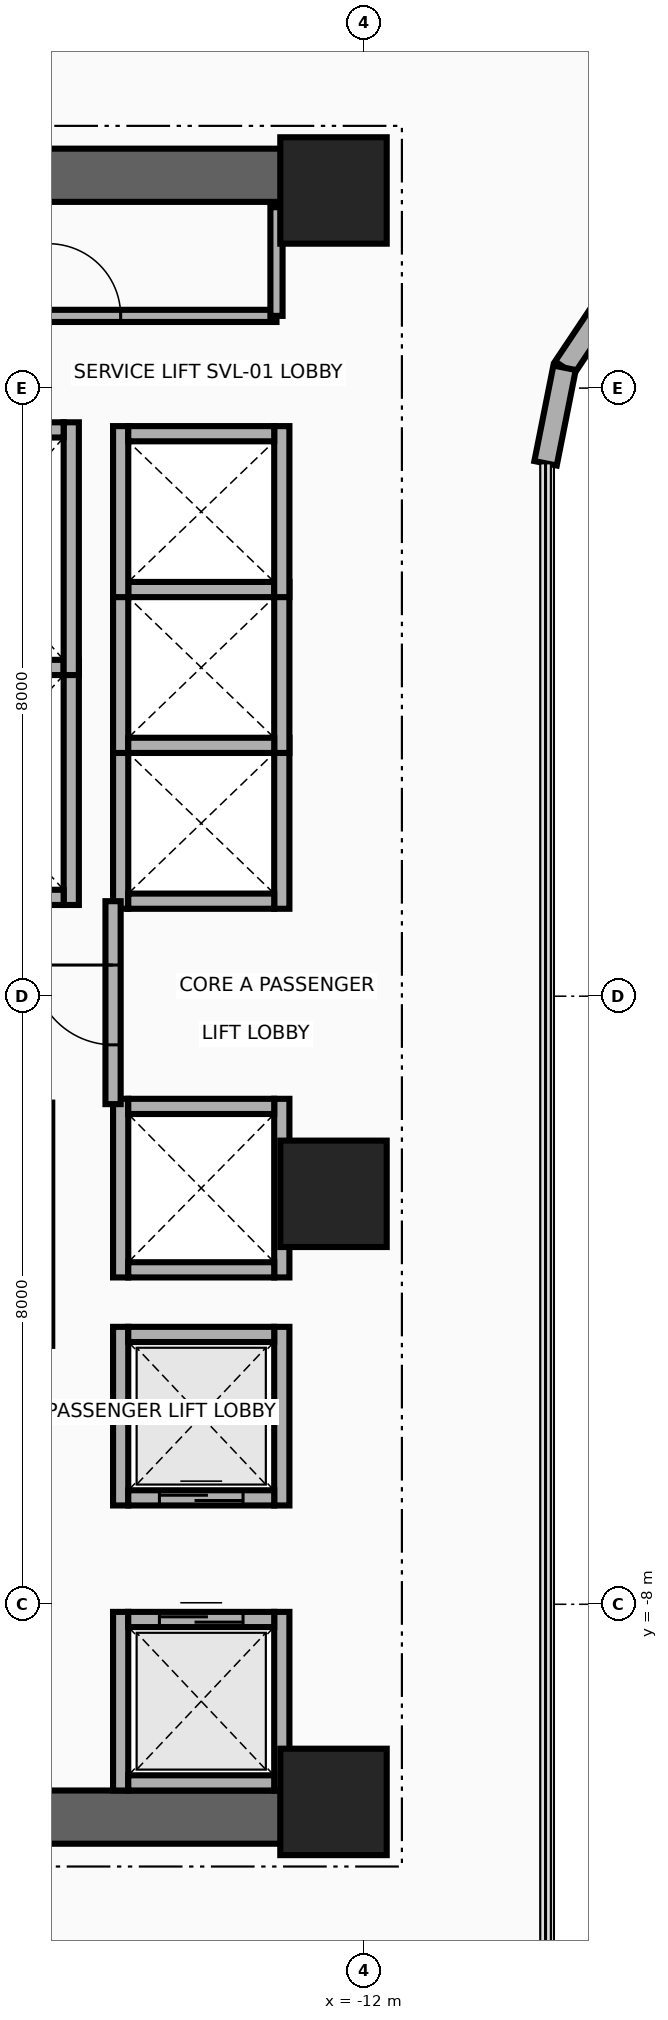
"""IFC4 building model, lengths in metres.
Left out: names, types, materials, properties, quantities, classifications, styles, units other than length and angle.
Written with IfcOpenShell. Run it as: python <this file> out.ifc"""

import sys

from ifc_helpers import new_model, si_unit, direction, frame, frame_2d, origin, origin_2d, place, context, subcontext, project, spatial, rectangle, extrude, source, transform, mapped, element, fill, save


model = new_model("IFC4")
c1 = context("Model", 3, precision=1e-05, world=origin(), true_north=direction((0.0, 1.0)))
c2 = subcontext(c1, "Body", "Model", "MODEL_VIEW")
j1 = project(units=[si_unit("LENGTHUNIT", "METRE"), si_unit("PLANEANGLEUNIT", "RADIAN")], contexts=[c1])
p1 = place(None, origin())
s1 = spatial("IfcSite", under=j1, at=p1, CompositionType="ELEMENT")
p2 = place(p1, origin())
s2 = spatial("IfcBuilding", under=s1, at=p2, CompositionType="ELEMENT")
p3 = place(p2, frame((0.0, 0.0, 51.9)))
s3 = spatial("IfcBuildingStorey", under=s2, at=p3, CompositionType="ELEMENT", Elevation=51.9)
for number, where, z_axis, x_axis in (
    (1, (-22.65, 10.8, 0.0), (0.0, 0.0, 1.0), (1.0, 0.0, 0.0)),
    (2, (-22.65, -10.8, 0.0), (0.0, 0.0, 1.0), (1.0, 0.0, 0.0)),
):
    element("IfcWall", number, at=place(p3, frame(where, z_axis=z_axis, x_axis=x_axis)), inside=s3, PredefinedType="SHEAR", context=c2, shape_type="SweptSolid", body=[
        extrude(rectangle(XDim=10.25, YDim=0.7, at=frame_2d((5.125, 0.0))), origin(), (0.0, 0.0, 1.0), 3.46),
    ])
m1 = source(origin(), c2, "Body", "SweptSolid", [
    extrude(rectangle(XDim=1.4, YDim=1.4, at=origin_2d()), origin(), (0.0, 0.0, 1.0), 3.7),
])
for number, where, z_axis, x_axis in (
    (3, (-12.4, -10.6, 0.0), (0.0, 0.0, 1.0), (1.0, 0.0, 0.0)),
    (4, (-12.4, -2.6, 0.0), (0.0, 0.0, 1.0), (1.0, 0.0, 0.0)),
    (5, (-12.4, 10.6, 0.0), (0.0, 0.0, 1.0), (1.0, 0.0, 0.0)),
):
    element("IfcColumn", number, at=place(p3, frame(where, z_axis=z_axis, x_axis=x_axis)), inside=s3, PredefinedType="COLUMN", context=c2, shape_type="MappedRepresentation", body=[
        mapped(m1, transform((0.0, 0.0, 0.0), x_axis=(1.0, 0.0, 0.0), y_axis=(0.0, 1.0, 0.0), z_axis=(0.0, 0.0, 1.0), scale=1.0)),
    ])
p4 = place(p3, frame((-8.642, 9.342, 0.0), z_axis=(0.0, 0.0, 1.0), x_axis=(-0.555615398575, -0.831439431869, 0.0)))
e6 = element("IfcWall", 6, at=p4, inside=s3, PredefinedType="SOLIDWALL", context=c2, shape_type="SweptSolid", body=[
    extrude(rectangle(XDim=1.292, YDim=0.3, at=frame_2d((0.646, 0.0))), origin(), (0.0, 0.0, 1.0), 3.46),
])
p5 = place(p3, frame((-9.36, 8.268, 0.0), z_axis=(0.0, 0.0, 1.0), x_axis=(-0.195090163074, -0.980785312019, 0.0)))
e7 = element("IfcWall", 7, at=p5, inside=s3, PredefinedType="SOLIDWALL", context=c2, shape_type="SweptSolid", body=[
    extrude(rectangle(XDim=1.281, YDim=0.3, at=frame_2d((0.641, 0.0))), origin(), (0.0, 0.0, 1.0), 3.46),
])
p6 = place(p3, frame((-15.85, 1.2, 0.0), z_axis=(0.0, 0.0, 1.0), x_axis=(0.0, 1.0, 0.0)))
e8 = element("IfcWall", 8, at=p6, inside=s3, PredefinedType="MOVABLE", context=c2, shape_type="SweptSolid", body=[
    extrude(rectangle(XDim=3.225, YDim=0.2, at=frame_2d((1.613, 0.0))), origin(), (0.0, 0.0, 1.0), 3.46),
])
p7 = place(p3, frame((-18.55, 1.3, 0.0), z_axis=(0.0, 0.0, 1.0), x_axis=(1.0, 0.0, 0.0)))
e9 = element("IfcWall", 9, at=p7, inside=s3, PredefinedType="MOVABLE", context=c2, shape_type="SweptSolid", body=[
    extrude(rectangle(XDim=2.6, YDim=0.2, at=frame_2d((1.3, 0.0))), origin(), (0.0, 0.0, 1.0), 3.46),
])
p8 = place(p7, frame((0.7, 0.0, 0.0)))
e10 = element("IfcOpeningElement", 10, at=p8, cuts=e9, PredefinedType="OPENING", context=c2, shape_type="SweptSolid", body=[
    extrude(rectangle(XDim=1.2, YDim=2.1, at=frame_2d((0.6, 1.05))), frame((0.0, 0.115, 0.0), z_axis=(0.0, -1.0, 0.0), x_axis=(1.0, 0.0, 0.0)), (0.0, 0.0, 1.0), 0.23),
])
p9 = place(p3, frame((-18.55, 4.325, 0.0), z_axis=(0.0, 0.0, 1.0), x_axis=(1.0, 0.0, 0.0)))
e11 = element("IfcWall", 11, at=p9, inside=s3, PredefinedType="MOVABLE", context=c2, shape_type="SweptSolid", body=[
    extrude(rectangle(XDim=2.6, YDim=0.2, at=frame_2d((1.3, 0.0))), origin(), (0.0, 0.0, 1.0), 3.46),
])
p10 = place(p3, frame((-16.2, -4.6, 0.0), z_axis=(0.0, 0.0, 1.0), x_axis=(0.0, 1.0, 0.0)))
e12 = element("IfcWall", 12, at=p10, inside=s3, PredefinedType="MOVABLE", context=c2, shape_type="SweptSolid", body=[
    extrude(rectangle(XDim=3.2, YDim=0.2, at=frame_2d((1.6, 0.0))), origin(), (0.0, 0.0, 1.0), 3.46),
])
p11 = place(p3, frame((-15.85, 4.225, 0.0), z_axis=(0.0, 0.0, 1.0), x_axis=(0.0, 1.0, 0.0)))
e13 = element("IfcWall", 13, at=p11, inside=s3, PredefinedType="MOVABLE", context=c2, shape_type="SweptSolid", body=[
    extrude(rectangle(XDim=3.325, YDim=0.2, at=frame_2d((1.663, 0.0))), origin(), (0.0, 0.0, 1.0), 3.46),
])
p12 = place(p3, frame((-18.55, 7.45, 0.0), z_axis=(0.0, 0.0, 1.0), x_axis=(1.0, 0.0, 0.0)))
e14 = element("IfcWall", 14, at=p12, inside=s3, PredefinedType="MOVABLE", context=c2, shape_type="SweptSolid", body=[
    extrude(rectangle(XDim=2.6, YDim=0.2, at=frame_2d((1.3, 0.0))), origin(), (0.0, 0.0, 1.0), 3.46),
])
p13 = place(p12, frame((0.7, 0.0, 0.0)))
e15 = element("IfcOpeningElement", 15, at=p13, cuts=e14, PredefinedType="OPENING", context=c2, shape_type="SweptSolid", body=[
    extrude(rectangle(XDim=1.2, YDim=2.1, at=frame_2d((0.6, 1.05))), frame((0.0, 0.115, 0.0), z_axis=(0.0, -1.0, 0.0), x_axis=(1.0, 0.0, 0.0)), (0.0, 0.0, 1.0), 0.23),
])
for number, where, z_axis, x_axis in (
    (16, (-15.2, -10.45, 0.0), (0.0, 0.0, 1.0), (0.0, 1.0, 0.0)),
    (17, (-13.08, -10.45, 0.0), (0.0, 0.0, 1.0), (0.0, 1.0, 0.0)),
):
    element("IfcWall", number, at=place(p3, frame(where, z_axis=z_axis, x_axis=x_axis)), inside=s3, PredefinedType="MOVABLE", context=c2, shape_type="SweptSolid", body=[
        extrude(rectangle(XDim=2.35, YDim=0.2, at=frame_2d((1.175, 0.0))), origin(), (0.0, 0.0, 1.0), 2.583),
    ])
p14 = place(p3, frame((-15.1, -10.35, 0.0), z_axis=(0.0, 0.0, 1.0), x_axis=(1.0, 0.0, 0.0)))
e18 = element("IfcWall", 18, at=p14, inside=s3, PredefinedType="MOVABLE", context=c2, shape_type="SweptSolid", body=[
    extrude(rectangle(XDim=1.92, YDim=0.2, at=frame_2d((0.96, 0.0))), origin(), (0.0, 0.0, 1.0), 2.583),
])
p15 = place(p3, frame((-15.1, -8.2, 0.0), z_axis=(0.0, 0.0, 1.0), x_axis=(1.0, 0.0, 0.0)))
e19 = element("IfcWall", 19, at=p15, inside=s3, PredefinedType="MOVABLE", context=c2, shape_type="SweptSolid", body=[
    extrude(rectangle(XDim=1.92, YDim=0.2, at=frame_2d((0.96, 0.0))), origin(), (0.0, 0.0, 1.0), 3.46),
])
p16 = place(p15, frame((0.41, 0.0, 0.0)))
e20 = element("IfcOpeningElement", 20, at=p16, cuts=e19, PredefinedType="OPENING", context=c2, shape_type="SweptSolid", body=[
    extrude(rectangle(XDim=1.1, YDim=2.1, at=frame_2d((0.55, 1.05))), frame((0.0, 0.115, 0.0), z_axis=(0.0, -1.0, 0.0), x_axis=(1.0, 0.0, 0.0)), (0.0, 0.0, 1.0), 0.23),
])
for number, where, z_axis, x_axis in (
    (21, (-15.2, -6.7, 0.0), (0.0, 0.0, 1.0), (0.0, 1.0, 0.0)),
    (22, (-13.08, -6.7, 0.0), (0.0, 0.0, 1.0), (0.0, 1.0, 0.0)),
):
    element("IfcWall", number, at=place(p3, frame(where, z_axis=z_axis, x_axis=x_axis)), inside=s3, PredefinedType="MOVABLE", context=c2, shape_type="SweptSolid", body=[
        extrude(rectangle(XDim=2.35, YDim=0.2, at=frame_2d((1.175, 0.0))), origin(), (0.0, 0.0, 1.0), 3.46),
    ])
p17 = place(p3, frame((-15.1, -6.6, 0.0), z_axis=(0.0, 0.0, 1.0), x_axis=(1.0, 0.0, 0.0)))
e23 = element("IfcWall", 23, at=p17, inside=s3, PredefinedType="MOVABLE", context=c2, shape_type="SweptSolid", body=[
    extrude(rectangle(XDim=1.92, YDim=0.2, at=frame_2d((0.96, 0.0))), origin(), (0.0, 0.0, 1.0), 3.46),
])
p18 = place(p17, frame((0.41, 0.0, 0.0)))
e24 = element("IfcOpeningElement", 24, at=p18, cuts=e23, PredefinedType="OPENING", context=c2, shape_type="SweptSolid", body=[
    extrude(rectangle(XDim=1.1, YDim=2.1, at=frame_2d((0.55, 1.05))), frame((0.0, 0.115, 0.0), z_axis=(0.0, -1.0, 0.0), x_axis=(1.0, 0.0, 0.0)), (0.0, 0.0, 1.0), 0.23),
])
p19 = place(p3, frame((-15.1, -4.45, 0.0), z_axis=(0.0, 0.0, 1.0), x_axis=(1.0, 0.0, 0.0)))
e25 = element("IfcWall", 25, at=p19, inside=s3, PredefinedType="MOVABLE", context=c2, shape_type="SweptSolid", body=[
    extrude(rectangle(XDim=1.92, YDim=0.2, at=frame_2d((0.96, 0.0))), origin(), (0.0, 0.0, 1.0), 3.46),
])
for number, where, z_axis, x_axis in (
    (26, (-15.2, 1.15, 0.0), (0.0, 0.0, 1.0), (0.0, 1.0, 0.0)),
    (27, (-13.08, 1.15, 0.0), (0.0, 0.0, 1.0), (0.0, 1.0, 0.0)),
):
    element("IfcWall", number, at=place(p3, frame(where, z_axis=z_axis, x_axis=x_axis)), inside=s3, PredefinedType="MOVABLE", context=c2, shape_type="SweptSolid", body=[
        extrude(rectangle(XDim=2.25, YDim=0.2, at=frame_2d((1.125, 0.0))), origin(), (0.0, 0.0, 1.0), 3.46),
    ])
p20 = place(p3, frame((-15.1, 1.25, 0.0), z_axis=(0.0, 0.0, 1.0), x_axis=(1.0, 0.0, 0.0)))
e28 = element("IfcWall", 28, at=p20, inside=s3, PredefinedType="MOVABLE", context=c2, shape_type="SweptSolid", body=[
    extrude(rectangle(XDim=1.92, YDim=0.2, at=frame_2d((0.96, 0.0))), origin(), (0.0, 0.0, 1.0), 3.46),
])
for number, where, z_axis, x_axis in (
    (29, (-15.2, 3.2, 0.0), (0.0, 0.0, 1.0), (0.0, 1.0, 0.0)),
    (30, (-13.08, 3.2, 0.0), (0.0, 0.0, 1.0), (0.0, 1.0, 0.0)),
):
    element("IfcWall", number, at=place(p3, frame(where, z_axis=z_axis, x_axis=x_axis)), inside=s3, PredefinedType="MOVABLE", context=c2, shape_type="SweptSolid", body=[
        extrude(rectangle(XDim=2.25, YDim=0.2, at=frame_2d((1.125, 0.0))), origin(), (0.0, 0.0, 1.0), 3.46),
    ])
for number, where, z_axis, x_axis in (
    (31, (-15.1, 3.3, 0.0), (0.0, 0.0, 1.0), (1.0, 0.0, 0.0)),
    (32, (-15.1, 5.35, 0.0), (0.0, 0.0, 1.0), (1.0, 0.0, 0.0)),
):
    element("IfcWall", number, at=place(p3, frame(where, z_axis=z_axis, x_axis=x_axis)), inside=s3, PredefinedType="MOVABLE", context=c2, shape_type="SweptSolid", body=[
        extrude(rectangle(XDim=1.92, YDim=0.2, at=frame_2d((0.96, 0.0))), origin(), (0.0, 0.0, 1.0), 3.46),
    ])
for number, where, z_axis, x_axis in (
    (33, (-15.2, 5.25, 0.0), (0.0, 0.0, 1.0), (0.0, 1.0, 0.0)),
    (34, (-13.08, 5.25, 0.0), (0.0, 0.0, 1.0), (0.0, 1.0, 0.0)),
):
    element("IfcWall", number, at=place(p3, frame(where, z_axis=z_axis, x_axis=x_axis)), inside=s3, PredefinedType="MOVABLE", context=c2, shape_type="SweptSolid", body=[
        extrude(rectangle(XDim=2.25, YDim=0.2, at=frame_2d((1.125, 0.0))), origin(), (0.0, 0.0, 1.0), 3.46),
    ])
p21 = place(p3, frame((-15.1, 7.4, 0.0), z_axis=(0.0, 0.0, 1.0), x_axis=(1.0, 0.0, 0.0)))
e35 = element("IfcWall", 35, at=p21, inside=s3, PredefinedType="MOVABLE", context=c2, shape_type="SweptSolid", body=[
    extrude(rectangle(XDim=1.92, YDim=0.2, at=frame_2d((0.96, 0.0))), origin(), (0.0, 0.0, 1.0), 3.46),
])
for number, where, z_axis, x_axis in (
    (36, (-15.2, -3.7, 0.0), (0.0, 0.0, 1.0), (0.0, 1.0, 0.0)),
    (37, (-13.08, -3.7, 0.0), (0.0, 0.0, 1.0), (0.0, 1.0, 0.0)),
):
    element("IfcWall", number, at=place(p3, frame(where, z_axis=z_axis, x_axis=x_axis)), inside=s3, PredefinedType="MOVABLE", context=c2, shape_type="SweptSolid", body=[
        extrude(rectangle(XDim=2.35, YDim=0.2, at=frame_2d((1.175, 0.0))), origin(), (0.0, 0.0, 1.0), 3.46),
    ])
for number, where, z_axis, x_axis in (
    (38, (-15.1, -3.6, 0.0), (0.0, 0.0, 1.0), (1.0, 0.0, 0.0)),
    (39, (-15.1, -1.45, 0.0), (0.0, 0.0, 1.0), (1.0, 0.0, 0.0)),
):
    element("IfcWall", number, at=place(p3, frame(where, z_axis=z_axis, x_axis=x_axis)), inside=s3, PredefinedType="MOVABLE", context=c2, shape_type="SweptSolid", body=[
        extrude(rectangle(XDim=1.92, YDim=0.2, at=frame_2d((0.96, 0.0))), origin(), (0.0, 0.0, 1.0), 3.46),
    ])
p22 = place(p3, frame((-15.3, -1.42, 0.0), z_axis=(0.0, 0.0, 1.0), x_axis=(0.0, 1.0, 0.0)))
e40 = element("IfcWall", 40, at=p22, inside=s3, PredefinedType="PARTITIONING", context=c2, shape_type="SweptSolid", body=[
    extrude(rectangle(XDim=2.67, YDim=0.2, at=frame_2d((1.335, 0.0))), origin(), (0.0, 0.0, 1.0), 3.46),
])
p23 = place(p22, frame((0.78, 0.0, 0.0)))
e41 = element("IfcOpeningElement", 41, at=p23, cuts=e40, PredefinedType="OPENING", context=c2, shape_type="SweptSolid", body=[
    extrude(rectangle(XDim=1.05, YDim=2.15, at=frame_2d((0.525, 1.075))), frame((0.0, 0.115, 0.0), z_axis=(0.0, -1.0, 0.0), x_axis=(1.0, 0.0, 0.0)), (0.0, 0.0, 1.0), 0.23),
])
p24 = place(p3, frame((-18.65, 8.95, 0.0), z_axis=(0.0, 0.0, 1.0), x_axis=(1.0, 0.0, 0.0)))
e42 = element("IfcWall", 42, at=p24, inside=s3, PredefinedType="PARTITIONING", context=c2, shape_type="SweptSolid", body=[
    extrude(rectangle(XDim=5.5, YDim=0.16, at=frame_2d((2.75, 0.0))), origin(), (0.0, 0.0, 1.0), 3.46),
])
p25 = place(p24, frame((0.3, 0.0, 0.0)))
e43 = element("IfcOpeningElement", 43, at=p25, cuts=e42, PredefinedType="OPENING", context=c2, shape_type="SweptSolid", body=[
    extrude(rectangle(XDim=0.85, YDim=2.05, at=frame_2d((0.425, 1.025))), frame((0.0, 0.095, 0.0), z_axis=(0.0, -1.0, 0.0), x_axis=(1.0, 0.0, 0.0)), (0.0, 0.0, 1.0), 0.19),
])
p26 = place(p24, frame((2.5, 0.0, 0.0)))
e44 = element("IfcOpeningElement", 44, at=p26, cuts=e42, PredefinedType="OPENING", context=c2, shape_type="SweptSolid", body=[
    extrude(rectangle(XDim=0.95, YDim=2.15, at=frame_2d((0.475, 1.075))), frame((0.0, 0.095, 0.0), z_axis=(0.0, -1.0, 0.0), x_axis=(1.0, 0.0, 0.0)), (0.0, 0.0, 1.0), 0.19),
])
p27 = place(p3, frame((-13.15, 8.95, 0.0), z_axis=(0.0, 0.0, 1.0), x_axis=(0.0, 1.0, 0.0)))
e45 = element("IfcWall", 45, at=p27, inside=s3, PredefinedType="PARTITIONING", context=c2, shape_type="SweptSolid", body=[
    extrude(rectangle(XDim=1.43, YDim=0.16, at=frame_2d((0.715, 0.0))), origin(), (0.0, 0.0, 1.0), 3.46),
])
p28 = place(p16, origin())
e46 = element("IfcDoor", 46, at=p28, inside=s3, OperationType="DOUBLE_DOOR_SLIDING", PredefinedType="DOOR", context=c2, shape_type="SweptSolid", body=[
    extrude(rectangle(XDim=1.1, YDim=2.1, at=frame_2d((0.55, 1.05))), frame((0.0, 0.025, 0.0), z_axis=(0.0, -1.0, 0.0), x_axis=(1.0, 0.0, 0.0)), (0.0, 0.0, 1.0), 0.05),
])
fill(e20, e46)
p29 = place(p18, origin())
e47 = element("IfcDoor", 47, at=p29, inside=s3, OperationType="DOUBLE_DOOR_SLIDING", PredefinedType="DOOR", context=c2, shape_type="SweptSolid", body=[
    extrude(rectangle(XDim=1.1, YDim=2.1, at=frame_2d((0.55, 1.05))), frame((0.0, 0.025, 0.0), z_axis=(0.0, -1.0, 0.0), x_axis=(1.0, 0.0, 0.0)), (0.0, 0.0, 1.0), 0.05),
])
fill(e24, e47)
p30 = place(p23, origin())
e48 = element("IfcDoor", 48, at=p30, inside=s3, OperationType="SINGLE_SWING_RIGHT", PredefinedType="DOOR", context=c2, shape_type="SweptSolid", body=[
    extrude(rectangle(XDim=1.05, YDim=2.15, at=frame_2d((0.525, 1.075))), frame((0.0, 0.025, 0.0), z_axis=(0.0, -1.0, 0.0), x_axis=(1.0, 0.0, 0.0)), (0.0, 0.0, 1.0), 0.05),
])
fill(e41, e48)
p31 = place(p26, origin())
e49 = element("IfcDoor", 49, at=p31, inside=s3, OperationType="SINGLE_SWING_RIGHT", PredefinedType="DOOR", context=c2, shape_type="SweptSolid", body=[
    extrude(rectangle(XDim=0.95, YDim=2.15, at=frame_2d((0.475, 1.075))), frame((0.0, 0.025, 0.0), z_axis=(0.0, -1.0, 0.0), x_axis=(1.0, 0.0, 0.0)), (0.0, 0.0, 1.0), 0.05),
])
fill(e44, e49)
save(model, sys.argv[1])
